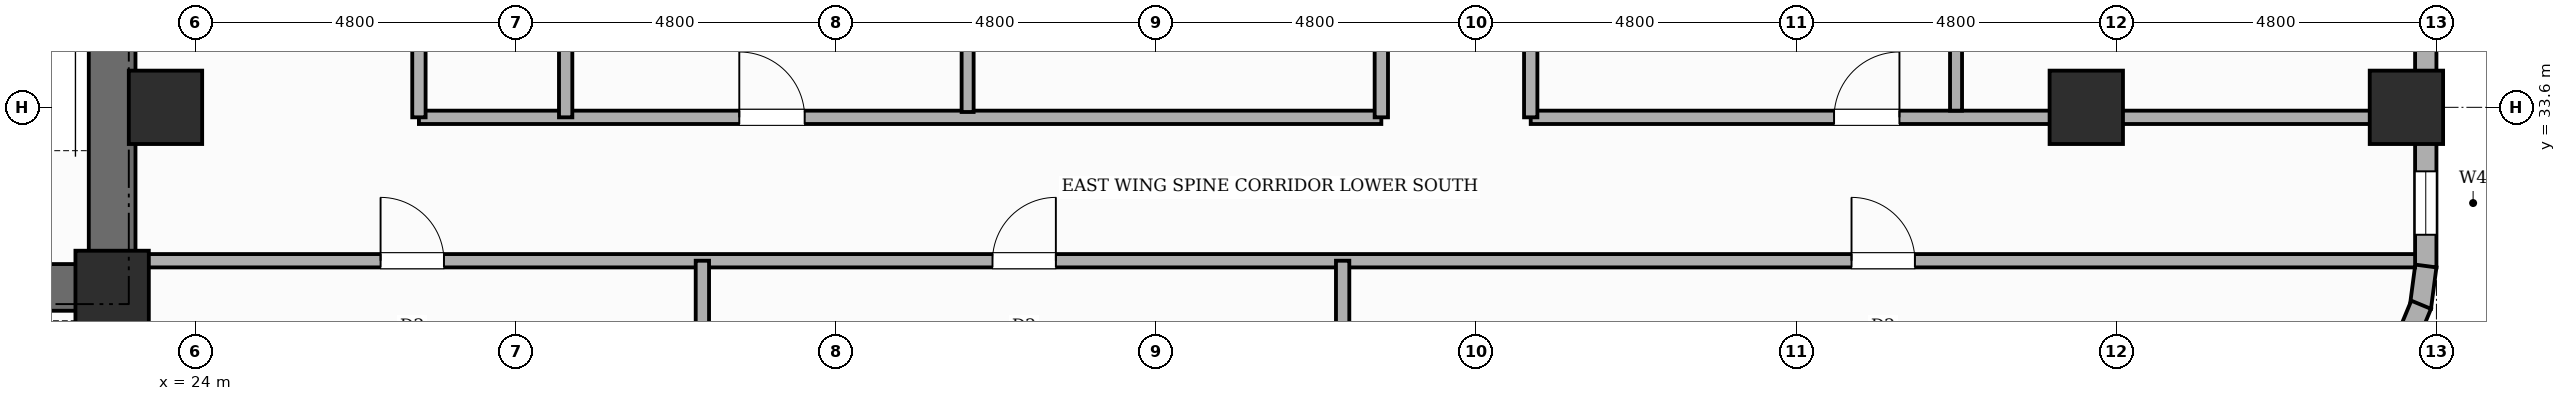
"""IFC4 building model, lengths in metres.
Left out: names, types, materials, properties, quantities, classifications, styles, units other than length and angle.
Written with IfcOpenShell. Run it as: python <this file> out.ifc"""

import sys

from ifc_helpers import new_model, si_unit, direction, frame, frame_2d, origin, origin_2d, place, context, subcontext, project, spatial, rectangle, extrude, element, fill, save


model = new_model("IFC4")
c1 = context("Model", 3, precision=1e-05, world=origin(), true_north=direction((0.0, 1.0)))
c2 = subcontext(c1, "Body", "Model", "MODEL_VIEW")
j1 = project(units=[si_unit("LENGTHUNIT", "METRE"), si_unit("PLANEANGLEUNIT", "RADIAN")], contexts=[c1])
p1 = place(None, origin())
s1 = spatial("IfcSite", under=j1, at=p1, CompositionType="ELEMENT")
p2 = place(p1, origin())
s2 = spatial("IfcBuilding", under=s1, at=p2, CompositionType="ELEMENT")
p3 = place(p2, frame((0.0, 0.0, 57.4)))
s3 = spatial("IfcBuildingStorey", under=s2, at=p3, CompositionType="ELEMENT", Elevation=57.4)
p4 = place(p3, frame((22.75, 30.55, 0.0), z_axis=(0.0, 0.0, 1.0), x_axis=(0.0, 1.0, 0.0)))
e1 = element("IfcWall", 1, at=p4, inside=s3, PredefinedType="SHEAR", context=c2, shape_type="SweptSolid", body=[
    extrude(rectangle(XDim=15.6, YDim=0.7, at=frame_2d((7.8, 0.0))), origin(), (0.0, 0.0, 1.0), 3.6),
])
p5 = place(p4, frame((10.8, 0.0, 0.0)))
e2 = element("IfcOpeningElement", 2, at=p5, cuts=e1, PredefinedType="OPENING", context=c2, shape_type="SweptSolid", body=[
    extrude(rectangle(XDim=1.0, YDim=2.15, at=frame_2d((0.5, 1.075))), frame((0.0, 0.36, 0.0), z_axis=(0.0, -1.0, 0.0), x_axis=(1.0, 0.0, 0.0)), (0.0, 0.0, 1.0), 0.72),
])
p6 = place(p3, frame((18.84, 30.9, 0.0), z_axis=(0.0, 0.0, 1.0), x_axis=(1.0, 0.0, 0.0)))
e3 = element("IfcWall", 3, at=p6, inside=s3, PredefinedType="SHEAR", context=c2, shape_type="SweptSolid", body=[
    extrude(rectangle(XDim=3.91, YDim=0.7, at=frame_2d((1.955, 0.0))), origin(), (0.0, 0.0, 1.0), 3.6),
])
for number, where, z_axis, x_axis in (
    (4, (22.75, 30.9, 0.0), (0.0, 0.0, 1.0), (1.0, 0.0, 0.0)),
    (5, (23.55, 33.6, 0.0), (0.0, 0.0, 1.0), (1.0, 0.0, 0.0)),
    (6, (52.35, 33.6, 0.0), (0.0, 0.0, 1.0), (1.0, 0.0, 0.0)),
    (7, (57.15, 33.6, 0.0), (0.0, 0.0, 1.0), (1.0, 0.0, 0.0)),
):
    element("IfcColumn", number, at=place(p3, frame(where, z_axis=z_axis, x_axis=x_axis)), inside=s3, PredefinedType="COLUMN", context=c2, shape_type="SweptSolid", body=[
        extrude(rectangle(XDim=1.1, YDim=1.1, at=origin_2d()), origin(), (0.0, 0.0, 1.0), 3.6),
    ])
p7 = place(p3, frame((57.44, 45.6, 0.0), z_axis=(0.0, 0.0, 1.0), x_axis=(0.0, -1.0, 0.0)))
e8 = element("IfcWall", 8, at=p7, inside=s3, PredefinedType="STANDARD", context=c2, shape_type="SweptSolid", body=[
    extrude(rectangle(XDim=14.4, YDim=0.32, at=frame_2d((7.2, 0.0))), origin(), (0.0, 0.0, 1.0), 2.53),
])
p8 = place(p7, frame((3.75, 0.0, 0.0)))
e9 = element("IfcOpeningElement", 9, at=p8, cuts=e8, PredefinedType="OPENING", context=c2, shape_type="SweptSolid", body=[
    extrude(rectangle(XDim=1.1, YDim=2.15, at=frame_2d((0.55, 1.075))), frame((0.0, 0.17, 0.0), z_axis=(0.0, -1.0, 0.0), x_axis=(1.0, 0.0, 0.0)), (0.0, 0.0, 1.0), 0.34),
])
p9 = place(p7, frame((0.47, 0.0, 0.45)))
e10 = element("IfcOpeningElement", 10, at=p9, cuts=e8, PredefinedType="OPENING", context=c2, shape_type="SweptSolid", body=[
    extrude(rectangle(XDim=0.95, YDim=1.8, at=frame_2d((0.475, 0.9))), frame((0.0, 0.17, 0.0), z_axis=(0.0, -1.0, 0.0), x_axis=(1.0, 0.0, 0.0)), (0.0, 0.0, 1.0), 0.34),
])
p10 = place(p7, frame((12.96, 0.0, 0.45)))
e11 = element("IfcOpeningElement", 11, at=p10, cuts=e8, PredefinedType="OPENING", context=c2, shape_type="SweptSolid", body=[
    extrude(rectangle(XDim=0.95, YDim=1.8, at=frame_2d((0.475, 0.9))), frame((0.0, 0.17, 0.0), z_axis=(0.0, -1.0, 0.0), x_axis=(1.0, 0.0, 0.0)), (0.0, 0.0, 1.0), 0.34),
])
p11 = place(p7, frame((9.312, 0.0, 0.65)))
e12 = element("IfcOpeningElement", 12, at=p11, cuts=e8, PredefinedType="OPENING", context=c2, shape_type="SweptSolid", body=[
    extrude(rectangle(XDim=1.4, YDim=1.1, at=frame_2d((0.7, 0.55))), frame((0.0, 0.17, 0.0), z_axis=(0.0, -1.0, 0.0), x_axis=(1.0, 0.0, 0.0)), (0.0, 0.0, 1.0), 0.34),
])
p12 = place(p7, frame((5.407, 0.0, 0.45)))
e13 = element("IfcOpeningElement", 13, at=p12, cuts=e8, PredefinedType="OPENING", context=c2, shape_type="SweptSolid", body=[
    extrude(rectangle(XDim=0.95, YDim=1.8, at=frame_2d((0.475, 0.9))), frame((0.0, 0.17, 0.0), z_axis=(0.0, -1.0, 0.0), x_axis=(1.0, 0.0, 0.0)), (0.0, 0.0, 1.0), 0.34),
])
p13 = place(p3, frame((57.441, 31.221, 0.0), z_axis=(0.0, 0.0, 1.0), x_axis=(-0.130504898859, -0.991447664465, 0.0)))
e14 = element("IfcWall", 14, at=p13, inside=s3, PredefinedType="STANDARD", context=c2, shape_type="SweptSolid", body=[
    extrude(rectangle(XDim=0.627, YDim=0.32, at=frame_2d((0.313, 0.0))), origin(), (0.0, 0.0, 1.0), 3.35),
])
p14 = place(p3, frame((57.37, 30.64, 0.0), z_axis=(0.0, 0.0, 1.0), x_axis=(-0.382787856107, -0.923836271867, 0.0)))
e15 = element("IfcWall", 15, at=p14, inside=s3, PredefinedType="STANDARD", context=c2, shape_type="SweptSolid", body=[
    extrude(rectangle(XDim=0.626, YDim=0.32, at=frame_2d((0.313, 0.0))), origin(), (0.0, 0.0, 1.0), 3.35),
])
p15 = place(p3, frame((22.75, 27.9, 0.0), z_axis=(0.0, 0.0, 1.0), x_axis=(0.0, 1.0, 0.0)))
e16 = element("IfcWall", 16, at=p15, inside=s3, PredefinedType="POLYGONAL", context=c2, shape_type="SweptSolid", body=[
    extrude(rectangle(XDim=3.0, YDim=0.2, at=frame_2d((1.5, 0.0))), origin(), (0.0, 0.0, 1.0), 3.35),
])
p16 = place(p3, frame((22.75, 31.3, 0.0), z_axis=(0.0, 0.0, 1.0), x_axis=(1.0, 0.0, 0.0)))
e17 = element("IfcWall", 17, at=p16, inside=s3, PredefinedType="PARTITIONING", context=c2, shape_type="SweptSolid", body=[
    extrude(rectangle(XDim=34.53, YDim=0.2, at=frame_2d((17.265, 0.0))), origin(), (0.0, 0.0, 1.0), 3.35),
])
p17 = place(p16, frame((4.025, 0.0, 0.0)))
e18 = element("IfcOpeningElement", 18, at=p17, cuts=e17, PredefinedType="OPENING", context=c2, shape_type="SweptSolid", body=[
    extrude(rectangle(XDim=0.95, YDim=2.15, at=frame_2d((0.475, 1.075))), frame((0.0, 0.11, 0.0), z_axis=(0.0, -1.0, 0.0), x_axis=(1.0, 0.0, 0.0)), (0.0, 0.0, 1.0), 0.22),
])
p18 = place(p16, frame((13.2, 0.0, 0.0)))
e19 = element("IfcOpeningElement", 19, at=p18, cuts=e17, PredefinedType="OPENING", context=c2, shape_type="SweptSolid", body=[
    extrude(rectangle(XDim=0.95, YDim=2.15, at=frame_2d((0.475, 1.075))), frame((0.0, 0.11, 0.0), z_axis=(0.0, -1.0, 0.0), x_axis=(1.0, 0.0, 0.0)), (0.0, 0.0, 1.0), 0.22),
])
p19 = place(p16, frame((26.08, 0.0, 0.0)))
e20 = element("IfcOpeningElement", 20, at=p19, cuts=e17, PredefinedType="OPENING", context=c2, shape_type="SweptSolid", body=[
    extrude(rectangle(XDim=0.95, YDim=2.15, at=frame_2d((0.475, 1.075))), frame((0.0, 0.11, 0.0), z_axis=(0.0, -1.0, 0.0), x_axis=(1.0, 0.0, 0.0)), (0.0, 0.0, 1.0), 0.22),
])
p20 = place(p3, frame((27.35, 33.45, 0.0), z_axis=(0.0, 0.0, 1.0), x_axis=(1.0, 0.0, 0.0)))
e21 = element("IfcWall", 21, at=p20, inside=s3, PredefinedType="PARTITIONING", context=c2, shape_type="SweptSolid", body=[
    extrude(rectangle(XDim=14.43, YDim=0.2, at=frame_2d((7.215, 0.0))), origin(), (0.0, 0.0, 1.0), 3.35),
])
p21 = place(p20, frame((4.803, 0.0, 0.0)))
e22 = element("IfcOpeningElement", 22, at=p21, cuts=e21, PredefinedType="OPENING", context=c2, shape_type="SweptSolid", body=[
    extrude(rectangle(XDim=0.98, YDim=2.18, at=frame_2d((0.49, 1.09))), frame((0.0, 0.11, 0.0), z_axis=(0.0, -1.0, 0.0), x_axis=(1.0, 0.0, 0.0)), (0.0, 0.0, 1.0), 0.22),
])
p22 = place(p3, frame((44.02, 33.45, 0.0), z_axis=(0.0, 0.0, 1.0), x_axis=(1.0, 0.0, 0.0)))
e23 = element("IfcWall", 23, at=p22, inside=s3, PredefinedType="PARTITIONING", context=c2, shape_type="SweptSolid", body=[
    extrude(rectangle(XDim=13.26, YDim=0.2, at=frame_2d((6.63, 0.0))), origin(), (0.0, 0.0, 1.0), 2.53),
])
p23 = place(p22, frame((4.549, 0.0, 0.0)))
e24 = element("IfcOpeningElement", 24, at=p23, cuts=e23, PredefinedType="OPENING", context=c2, shape_type="SweptSolid", body=[
    extrude(rectangle(XDim=0.98, YDim=2.18, at=frame_2d((0.49, 1.09))), frame((0.0, 0.11, 0.0), z_axis=(0.0, -1.0, 0.0), x_axis=(1.0, 0.0, 0.0)), (0.0, 0.0, 1.0), 0.22),
])
p24 = place(p3, frame((27.35, 33.45, 0.0), z_axis=(0.0, 0.0, 1.0), x_axis=(0.0, 1.0, 0.0)))
e25 = element("IfcWall", 25, at=p24, inside=s3, PredefinedType="PARTITIONING", context=c2, shape_type="SweptSolid", body=[
    extrude(rectangle(XDim=14.23, YDim=0.2, at=frame_2d((7.115, 0.0))), origin(), (0.0, 0.0, 1.0), 3.35),
])
p25 = place(p24, frame((1.2, 0.0, 0.0)))
e26 = element("IfcOpeningElement", 26, at=p25, cuts=e25, PredefinedType="OPENING", context=c2, shape_type="SweptSolid", body=[
    extrude(rectangle(XDim=0.95, YDim=2.15, at=frame_2d((0.475, 1.075))), frame((0.0, 0.11, 0.0), z_axis=(0.0, -1.0, 0.0), x_axis=(1.0, 0.0, 0.0)), (0.0, 0.0, 1.0), 0.22),
])
p26 = place(p3, frame((41.78, 33.45, 0.0), z_axis=(0.0, 0.0, 1.0), x_axis=(0.0, 1.0, 0.0)))
e27 = element("IfcWall", 27, at=p26, inside=s3, PredefinedType="PARTITIONING", context=c2, shape_type="SweptSolid", body=[
    extrude(rectangle(XDim=4.85, YDim=0.2, at=frame_2d((2.425, 0.0))), origin(), (0.0, 0.0, 1.0), 3.35),
])
for number, where, z_axis, x_axis in (
    (28, (31.6, 29.12, 0.0), (0.0, 0.0, 1.0), (0.0, 1.0, 0.0)),
    (29, (41.2, 29.12, 0.0), (0.0, 0.0, 1.0), (0.0, 1.0, 0.0)),
):
    element("IfcWall", number, at=place(p3, frame(where, z_axis=z_axis, x_axis=x_axis)), inside=s3, PredefinedType="SOLIDWALL", context=c2, shape_type="SweptSolid", body=[
        extrude(rectangle(XDim=2.18, YDim=0.2, at=frame_2d((1.09, 0.0))), origin(), (0.0, 0.0, 1.0), 3.35),
    ])
p27 = place(p3, frame((29.55, 33.45, 0.0), z_axis=(0.0, 0.0, 1.0), x_axis=(0.0, 1.0, 0.0)))
e30 = element("IfcWall", 30, at=p27, inside=s3, PredefinedType="SOLIDWALL", context=c2, shape_type="SweptSolid", body=[
    extrude(rectangle(XDim=14.23, YDim=0.2, at=frame_2d((7.115, 0.0))), origin(), (0.0, 0.0, 1.0), 3.35),
])
p28 = place(p3, frame((35.577, 33.53, 0.0), z_axis=(0.0, 0.0, 1.0), x_axis=(0.0, 1.0, 0.0)))
e31 = element("IfcWall", 31, at=p28, inside=s3, PredefinedType="PLUMBINGWALL", context=c2, shape_type="SweptSolid", body=[
    extrude(rectangle(XDim=14.15, YDim=0.18, at=frame_2d((7.075, 0.0))), origin(), (0.0, 0.0, 1.0), 3.35),
])
p29 = place(p28, frame((0.993, 0.0, 0.0)))
e32 = element("IfcOpeningElement", 32, at=p29, cuts=e31, PredefinedType="OPENING", context=c2, shape_type="SweptSolid", body=[
    extrude(rectangle(XDim=0.86, YDim=2.1, at=frame_2d((0.43, 1.05))), frame((0.0, 0.1, 0.0), z_axis=(0.0, -1.0, 0.0), x_axis=(1.0, 0.0, 0.0)), (0.0, 0.0, 1.0), 0.2),
])
p30 = place(p28, frame((4.226, 0.0, 0.0)))
e33 = element("IfcOpeningElement", 33, at=p30, cuts=e31, PredefinedType="OPENING", context=c2, shape_type="SweptSolid", body=[
    extrude(rectangle(XDim=0.86, YDim=2.1, at=frame_2d((0.43, 1.05))), frame((0.0, 0.1, 0.0), z_axis=(0.0, -1.0, 0.0), x_axis=(1.0, 0.0, 0.0)), (0.0, 0.0, 1.0), 0.2),
])
p31 = place(p28, frame((7.396, 0.0, 0.0)))
e34 = element("IfcOpeningElement", 34, at=p31, cuts=e31, PredefinedType="OPENING", context=c2, shape_type="SweptSolid", body=[
    extrude(rectangle(XDim=0.86, YDim=2.1, at=frame_2d((0.43, 1.05))), frame((0.0, 0.1, 0.0), z_axis=(0.0, -1.0, 0.0), x_axis=(1.0, 0.0, 0.0)), (0.0, 0.0, 1.0), 0.2),
])
p32 = place(p28, frame((11.212, 0.0, 0.0)))
e35 = element("IfcOpeningElement", 35, at=p32, cuts=e31, PredefinedType="OPENING", context=c2, shape_type="SweptSolid", body=[
    extrude(rectangle(XDim=0.9, YDim=2.15, at=frame_2d((0.45, 1.075))), frame((0.0, 0.1, 0.0), z_axis=(0.0, -1.0, 0.0), x_axis=(1.0, 0.0, 0.0)), (0.0, 0.0, 1.0), 0.2),
])
p33 = place(p3, frame((50.397, 33.55, 0.0), z_axis=(0.0, 0.0, 1.0), x_axis=(0.0, 1.0, 0.0)))
e36 = element("IfcWall", 36, at=p33, inside=s3, PredefinedType="PLUMBINGWALL", context=c2, shape_type="SweptSolid", body=[
    extrude(rectangle(XDim=14.13, YDim=0.18, at=frame_2d((7.065, 0.0))), origin(), (0.0, 0.0, 1.0), 3.35),
])
p34 = place(p33, frame((1.083, 0.0, 0.0)))
e37 = element("IfcOpeningElement", 37, at=p34, cuts=e36, PredefinedType="OPENING", context=c2, shape_type="SweptSolid", body=[
    extrude(rectangle(XDim=0.86, YDim=2.1, at=frame_2d((0.43, 1.05))), frame((0.0, 0.1, 0.0), z_axis=(0.0, -1.0, 0.0), x_axis=(1.0, 0.0, 0.0)), (0.0, 0.0, 1.0), 0.2),
])
p35 = place(p33, frame((4.518, 0.0, 0.0)))
e38 = element("IfcOpeningElement", 38, at=p35, cuts=e36, PredefinedType="OPENING", context=c2, shape_type="SweptSolid", body=[
    extrude(rectangle(XDim=0.86, YDim=2.1, at=frame_2d((0.43, 1.05))), frame((0.0, 0.1, 0.0), z_axis=(0.0, -1.0, 0.0), x_axis=(1.0, 0.0, 0.0)), (0.0, 0.0, 1.0), 0.2),
])
p36 = place(p33, frame((7.884, 0.0, 0.0)))
e39 = element("IfcOpeningElement", 39, at=p36, cuts=e36, PredefinedType="OPENING", context=c2, shape_type="SweptSolid", body=[
    extrude(rectangle(XDim=0.86, YDim=2.1, at=frame_2d((0.43, 1.05))), frame((0.0, 0.1, 0.0), z_axis=(0.0, -1.0, 0.0), x_axis=(1.0, 0.0, 0.0)), (0.0, 0.0, 1.0), 0.2),
])
p37 = place(p33, frame((11.528, 0.0, 0.0)))
e40 = element("IfcOpeningElement", 40, at=p37, cuts=e36, PredefinedType="OPENING", context=c2, shape_type="SweptSolid", body=[
    extrude(rectangle(XDim=0.9, YDim=2.15, at=frame_2d((0.45, 1.075))), frame((0.0, 0.1, 0.0), z_axis=(0.0, -1.0, 0.0), x_axis=(1.0, 0.0, 0.0)), (0.0, 0.0, 1.0), 0.2),
])
p38 = place(p3, frame((44.02, 33.45, 0.0), z_axis=(0.0, 0.0, 1.0), x_axis=(0.0, 1.0, 0.0)))
e41 = element("IfcWall", 41, at=p38, inside=s3, PredefinedType="SOLIDWALL", context=c2, shape_type="SweptSolid", body=[
    extrude(rectangle(XDim=2.59, YDim=0.2, at=frame_2d((1.295, 0.0))), origin(), (0.0, 0.0, 1.0), 3.35),
])
p39 = place(p10, origin())
e42 = element("IfcWindow", 42, at=p39, inside=s3, PartitioningType="SINGLE_PANEL", PredefinedType="WINDOW", context=c2, shape_type="SweptSolid", body=[
    extrude(rectangle(XDim=0.95, YDim=1.8, at=frame_2d((0.475, 0.9))), frame((0.0, 0.03, 0.0), z_axis=(0.0, -1.0, 0.0), x_axis=(1.0, 0.0, 0.0)), (0.0, 0.0, 1.0), 0.06),
])
fill(e11, e42)
p40 = place(p17, origin())
e43 = element("IfcDoor", 43, at=p40, inside=s3, OperationType="SINGLE_SWING_LEFT", PredefinedType="DOOR", context=c2, shape_type="SweptSolid", body=[
    extrude(rectangle(XDim=0.95, YDim=2.15, at=frame_2d((0.475, 1.075))), frame((0.0, 0.025, 0.0), z_axis=(0.0, -1.0, 0.0), x_axis=(1.0, 0.0, 0.0)), (0.0, 0.0, 1.0), 0.05),
])
fill(e18, e43)
p41 = place(p18, origin())
e44 = element("IfcDoor", 44, at=p41, inside=s3, OperationType="SINGLE_SWING_RIGHT", PredefinedType="DOOR", context=c2, shape_type="SweptSolid", body=[
    extrude(rectangle(XDim=0.95, YDim=2.15, at=frame_2d((0.475, 1.075))), frame((0.0, 0.025, 0.0), z_axis=(0.0, -1.0, 0.0), x_axis=(1.0, 0.0, 0.0)), (0.0, 0.0, 1.0), 0.05),
])
fill(e19, e44)
p42 = place(p19, origin())
e45 = element("IfcDoor", 45, at=p42, inside=s3, OperationType="SINGLE_SWING_LEFT", PredefinedType="DOOR", context=c2, shape_type="SweptSolid", body=[
    extrude(rectangle(XDim=0.95, YDim=2.15, at=frame_2d((0.475, 1.075))), frame((0.0, 0.025, 0.0), z_axis=(0.0, -1.0, 0.0), x_axis=(1.0, 0.0, 0.0)), (0.0, 0.0, 1.0), 0.05),
])
fill(e20, e45)
p43 = place(p21, origin())
e46 = element("IfcDoor", 46, at=p43, inside=s3, OperationType="SINGLE_SWING_LEFT", PredefinedType="DOOR", context=c2, shape_type="SweptSolid", body=[
    extrude(rectangle(XDim=0.98, YDim=2.18, at=frame_2d((0.49, 1.09))), frame((0.0, 0.025, 0.0), z_axis=(0.0, -1.0, 0.0), x_axis=(1.0, 0.0, 0.0)), (0.0, 0.0, 1.0), 0.05),
])
fill(e22, e46)
p44 = place(p23, origin())
e47 = element("IfcDoor", 47, at=p44, inside=s3, OperationType="SINGLE_SWING_RIGHT", PredefinedType="DOOR", context=c2, shape_type="SweptSolid", body=[
    extrude(rectangle(XDim=0.98, YDim=2.18, at=frame_2d((0.49, 1.09))), frame((0.0, 0.025, 0.0), z_axis=(0.0, -1.0, 0.0), x_axis=(1.0, 0.0, 0.0)), (0.0, 0.0, 1.0), 0.05),
])
fill(e24, e47)
save(model, sys.argv[1])
